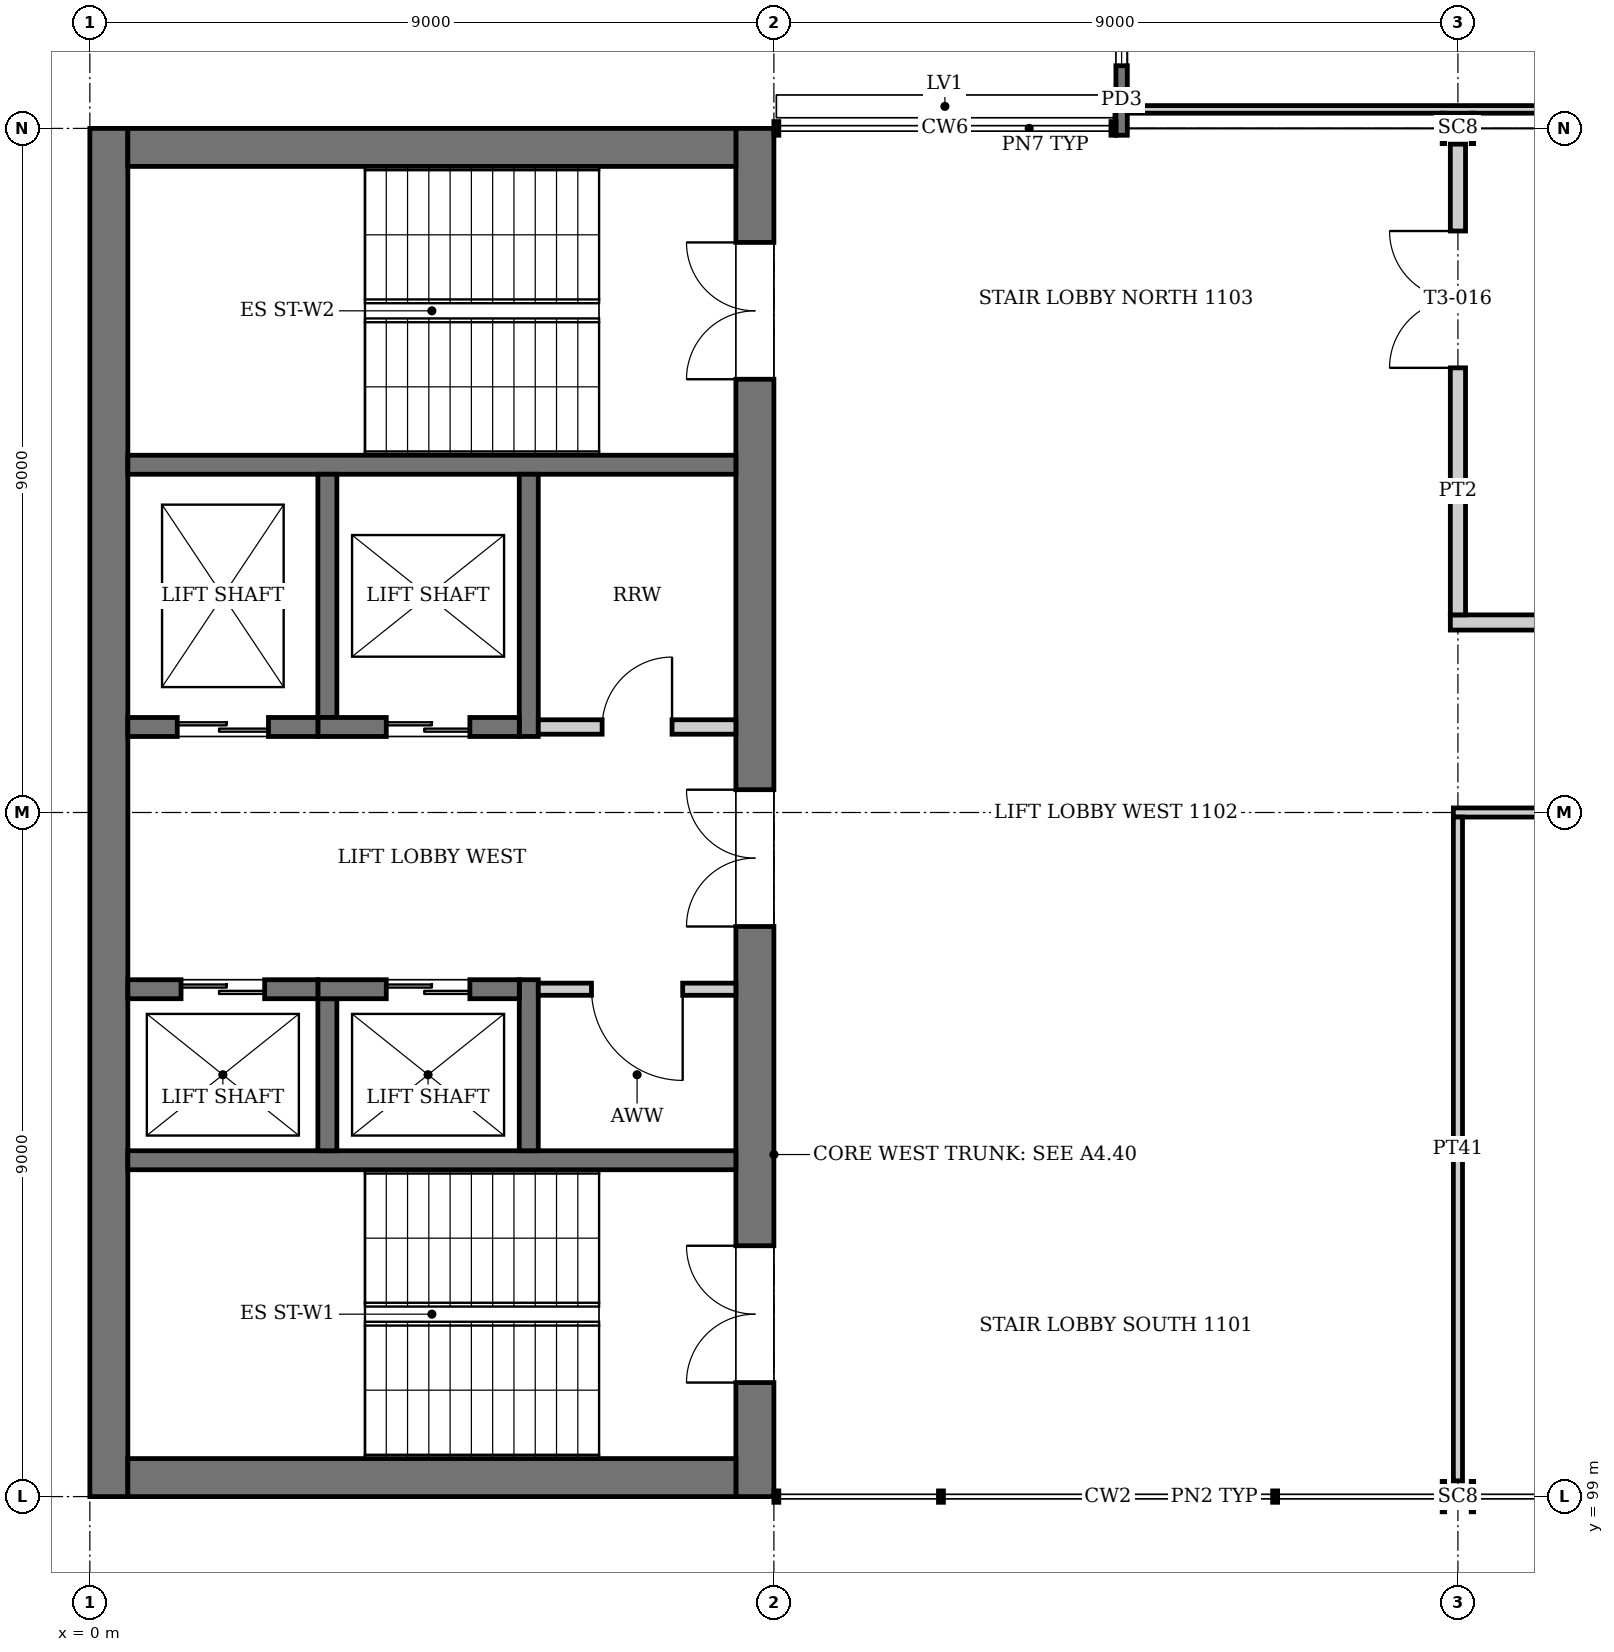
"""IFC4 building model, lengths in metres.
Left out: names, types, materials, properties, quantities, classifications, styles, units other than length and angle.
Written with IfcOpenShell. Run it as: python <this file> out.ifc"""

import sys

from ifc_helpers import new_model, si_unit, direction, frame, frame_2d, origin, origin_2d, place, context, subcontext, project, spatial, rectangle, i_section, extrude, element, fill, save


model = new_model("IFC4")
c1 = context("Model", 3, precision=1e-05, world=origin(), true_north=direction((0.0, 1.0)))
c2 = subcontext(c1, "Body", "Model", "MODEL_VIEW")
j1 = project(units=[si_unit("LENGTHUNIT", "METRE"), si_unit("PLANEANGLEUNIT", "RADIAN")], contexts=[c1])
p1 = place(None, origin())
s1 = spatial("IfcSite", under=j1, at=p1, CompositionType="ELEMENT")
p2 = place(p1, origin())
s2 = spatial("IfcBuilding", under=s1, at=p2, CompositionType="ELEMENT")
p3 = place(p2, frame((0.0, 0.0, 47.2)))
s3 = spatial("IfcBuildingStorey", under=s2, at=p3, CompositionType="ELEMENT", Elevation=47.2)
for number, where, z_axis, x_axis in (
    (1, (18.0, 99.0, 0.0), (0.0, 0.0, 1.0), (0.0, 1.0, 0.0)),
    (2, (18.0, 117.0, 0.0), (0.0, 0.0, 1.0), (0.0, 1.0, 0.0)),
):
    element("IfcColumn", number, at=place(p3, frame(where, z_axis=z_axis, x_axis=x_axis)), inside=s3, PredefinedType="COLUMN", context=c2, shape_type="SweptSolid", body=[
        extrude(i_section(OverallWidth=0.4, OverallDepth=0.414, WebThickness=0.025, FlangeThickness=0.032, at=origin_2d()), origin(), (0.0, 0.0, 1.0), 4.0),
    ])
p4 = place(p3, frame((0.25, 99.0, 0.0), z_axis=(0.0, 0.0, 1.0), x_axis=(0.0, 1.0, 0.0)))
e3 = element("IfcWall", 3, at=p4, inside=s3, PredefinedType="SHEAR", context=c2, shape_type="SweptSolid", body=[
    extrude(rectangle(XDim=18.0, YDim=0.5, at=frame_2d((9.0, 0.0))), origin(), (0.0, 0.0, 1.0), 4.0),
])
p5 = place(p3, frame((8.75, 99.0, 0.0), z_axis=(0.0, 0.0, 1.0), x_axis=(0.0, 1.0, 0.0)))
e4 = element("IfcWall", 4, at=p5, inside=s3, PredefinedType="SHEAR", context=c2, shape_type="SweptSolid", body=[
    extrude(rectangle(XDim=18.0, YDim=0.5, at=frame_2d((9.0, 0.0))), origin(), (0.0, 0.0, 1.0), 4.0),
])
p6 = place(p5, frame((1.5, 0.0, 0.0)))
e5 = element("IfcOpeningElement", 5, at=p6, cuts=e4, PredefinedType="OPENING", context=c2, shape_type="SweptSolid", body=[
    extrude(rectangle(XDim=1.8, YDim=2.1, at=frame_2d((0.9, 1.05))), frame((0.0, 0.26, 0.0), z_axis=(0.0, -1.0, 0.0), x_axis=(1.0, 0.0, 0.0)), (0.0, 0.0, 1.0), 0.52),
])
p7 = place(p5, frame((14.7, 0.0, 0.0)))
e6 = element("IfcOpeningElement", 6, at=p7, cuts=e4, PredefinedType="OPENING", context=c2, shape_type="SweptSolid", body=[
    extrude(rectangle(XDim=1.8, YDim=2.1, at=frame_2d((0.9, 1.05))), frame((0.0, 0.26, 0.0), z_axis=(0.0, -1.0, 0.0), x_axis=(1.0, 0.0, 0.0)), (0.0, 0.0, 1.0), 0.52),
])
p8 = place(p5, frame((7.5, 0.0, 0.0)))
e7 = element("IfcOpeningElement", 7, at=p8, cuts=e4, PredefinedType="OPENING", context=c2, shape_type="SweptSolid", body=[
    extrude(rectangle(XDim=1.8, YDim=2.1, at=frame_2d((0.9, 1.05))), frame((0.0, 0.26, 0.0), z_axis=(0.0, -1.0, 0.0), x_axis=(1.0, 0.0, 0.0)), (0.0, 0.0, 1.0), 0.52),
])
for number, where, z_axis, x_axis in (
    (8, (0.5, 99.25, 0.0), (0.0, 0.0, 1.0), (1.0, 0.0, 0.0)),
    (9, (0.5, 116.75, 0.0), (0.0, 0.0, 1.0), (1.0, 0.0, 0.0)),
):
    element("IfcWall", number, at=place(p3, frame(where, z_axis=z_axis, x_axis=x_axis)), inside=s3, PredefinedType="SHEAR", context=c2, shape_type="SweptSolid", body=[
        extrude(rectangle(XDim=8.0, YDim=0.5, at=frame_2d((4.0, 0.0))), origin(), (0.0, 0.0, 1.0), 4.0),
    ])
p9 = place(p3, frame((13.575, 120.45, -0.15), z_axis=(0.0, 0.0, 1.0), x_axis=(0.0, -1.0, 0.0)))
e10 = element("IfcWall", 10, at=p9, inside=s3, PredefinedType="SOLIDWALL", context=c2, shape_type="SweptSolid", body=[
    extrude(rectangle(XDim=3.54, YDim=0.15, at=frame_2d((1.77, 0.0))), origin(), (0.0, 0.0, 1.0), 2.75),
])
p10 = place(p9, frame((0.625, 0.0, 1.05)))
e11 = element("IfcOpeningElement", 11, at=p10, cuts=e10, PredefinedType="OPENING", context=c2, shape_type="SweptSolid", body=[
    extrude(rectangle(XDim=2.0, YDim=1.4, at=frame_2d((1.0, 0.7))), frame((0.0, 0.085, 0.0), z_axis=(0.0, -1.0, 0.0), x_axis=(1.0, 0.0, 0.0)), (0.0, 0.0, 1.0), 0.17),
])
p11 = place(p3, frame((13.65, 117.25, 0.0), z_axis=(0.0, 0.0, 1.0), x_axis=(1.0, 0.0, 0.0)))
e12 = element("IfcWall", 12, at=p11, inside=s3, PredefinedType="PARTITIONING", context=c2, shape_type="SweptSolid", body=[
    extrude(rectangle(XDim=13.2, YDim=0.1, at=frame_2d((6.6, 0.0))), origin(), (0.0, 0.0, 1.0), 2.6),
])
p12 = place(p11, frame((6.1, 0.0, 0.0)))
e13 = element("IfcOpeningElement", 13, at=p12, cuts=e12, PredefinedType="OPENING", context=c2, shape_type="SweptSolid", body=[
    extrude(rectangle(XDim=0.9, YDim=2.1, at=frame_2d((0.45, 1.05))), frame((0.0, 0.06, 0.0), z_axis=(0.0, -1.0, 0.0), x_axis=(1.0, 0.0, 0.0)), (0.0, 0.0, 1.0), 0.12),
])
for number, where, z_axis, x_axis in (
    (14, (8.5, 103.425, 0.0), (0.0, 0.0, 1.0), (-1.0, 0.0, 0.0)),
    (15, (8.5, 112.575, 0.0), (0.0, 0.0, 1.0), (-1.0, 0.0, 0.0)),
):
    element("IfcWall", number, at=place(p3, frame(where, z_axis=z_axis, x_axis=x_axis)), inside=s3, PredefinedType="SOLIDWALL", context=c2, shape_type="SweptSolid", body=[
        extrude(rectangle(XDim=8.0, YDim=0.25, at=frame_2d((4.0, 0.0))), origin(), (0.0, 0.0, 1.0), 3.75),
    ])
p13 = place(p3, frame((5.775, 103.55, 0.0), z_axis=(0.0, 0.0, 1.0), x_axis=(0.0, 1.0, 0.0)))
e16 = element("IfcWall", 16, at=p13, inside=s3, PredefinedType="SOLIDWALL", context=c2, shape_type="SweptSolid", body=[
    extrude(rectangle(XDim=2.25, YDim=0.25, at=frame_2d((1.125, 0.0))), origin(), (0.0, 0.0, 1.0), 4.0),
])
p14 = place(p3, frame((3.125, 103.55, 0.0), z_axis=(0.0, 0.0, 1.0), x_axis=(0.0, 1.0, 0.0)))
e17 = element("IfcWall", 17, at=p14, inside=s3, PredefinedType="SOLIDWALL", context=c2, shape_type="SweptSolid", body=[
    extrude(rectangle(XDim=2.0, YDim=0.25, at=frame_2d((1.0, 0.0))), origin(), (0.0, 0.0, 1.0), 4.0),
])
p15 = place(p3, frame((5.65, 105.675, 0.0), z_axis=(0.0, 0.0, 1.0), x_axis=(-1.0, 0.0, 0.0)))
e18 = element("IfcWall", 18, at=p15, inside=s3, PredefinedType="SOLIDWALL", context=c2, shape_type="SweptSolid", body=[
    extrude(rectangle(XDim=2.65, YDim=0.25, at=frame_2d((1.325, 0.0))), origin(), (0.0, 0.0, 1.0), 4.0),
])
p16 = place(p15, frame((0.65, 0.0, 0.0)))
e19 = element("IfcOpeningElement", 19, at=p16, cuts=e18, PredefinedType="OPENING", context=c2, shape_type="SweptSolid", body=[
    extrude(rectangle(XDim=1.1, YDim=2.1, at=frame_2d((0.55, 1.05))), frame((0.0, 0.135, 0.0), z_axis=(0.0, -1.0, 0.0), x_axis=(1.0, 0.0, 0.0)), (0.0, 0.0, 1.0), 0.27),
])
p17 = place(p3, frame((3.0, 105.675, 0.0), z_axis=(0.0, 0.0, 1.0), x_axis=(-1.0, 0.0, 0.0)))
e20 = element("IfcWall", 20, at=p17, inside=s3, PredefinedType="SOLIDWALL", context=c2, shape_type="SweptSolid", body=[
    extrude(rectangle(XDim=2.5, YDim=0.25, at=frame_2d((1.25, 0.0))), origin(), (0.0, 0.0, 1.0), 4.0),
])
p18 = place(p17, frame((0.7, 0.0, 0.0)))
e21 = element("IfcOpeningElement", 21, at=p18, cuts=e20, PredefinedType="OPENING", context=c2, shape_type="SweptSolid", body=[
    extrude(rectangle(XDim=1.1, YDim=2.1, at=frame_2d((0.55, 1.05))), frame((0.0, 0.135, 0.0), z_axis=(0.0, -1.0, 0.0), x_axis=(1.0, 0.0, 0.0)), (0.0, 0.0, 1.0), 0.27),
])
p19 = place(p3, frame((5.775, 109.0, 0.0), z_axis=(0.0, 0.0, 1.0), x_axis=(0.0, 1.0, 0.0)))
e22 = element("IfcWall", 22, at=p19, inside=s3, PredefinedType="SOLIDWALL", context=c2, shape_type="SweptSolid", body=[
    extrude(rectangle(XDim=3.45, YDim=0.25, at=frame_2d((1.725, 0.0))), origin(), (0.0, 0.0, 1.0), 4.0),
])
p20 = place(p3, frame((3.125, 109.25, 0.0), z_axis=(0.0, 0.0, 1.0), x_axis=(0.0, 1.0, 0.0)))
e23 = element("IfcWall", 23, at=p20, inside=s3, PredefinedType="SOLIDWALL", context=c2, shape_type="SweptSolid", body=[
    extrude(rectangle(XDim=3.2, YDim=0.25, at=frame_2d((1.6, 0.0))), origin(), (0.0, 0.0, 1.0), 4.0),
])
p21 = place(p3, frame((5.65, 109.125, 0.0), z_axis=(0.0, 0.0, 1.0), x_axis=(-1.0, 0.0, 0.0)))
e24 = element("IfcWall", 24, at=p21, inside=s3, PredefinedType="SOLIDWALL", context=c2, shape_type="SweptSolid", body=[
    extrude(rectangle(XDim=2.65, YDim=0.25, at=frame_2d((1.325, 0.0))), origin(), (0.0, 0.0, 1.0), 4.0),
])
p22 = place(p21, frame((0.65, 0.0, 0.0)))
e25 = element("IfcOpeningElement", 25, at=p22, cuts=e24, PredefinedType="OPENING", context=c2, shape_type="SweptSolid", body=[
    extrude(rectangle(XDim=1.1, YDim=2.1, at=frame_2d((0.55, 1.05))), frame((0.0, 0.135, 0.0), z_axis=(0.0, -1.0, 0.0), x_axis=(1.0, 0.0, 0.0)), (0.0, 0.0, 1.0), 0.27),
])
p23 = place(p3, frame((3.0, 109.125, 0.0), z_axis=(0.0, 0.0, 1.0), x_axis=(-1.0, 0.0, 0.0)))
e26 = element("IfcWall", 26, at=p23, inside=s3, PredefinedType="SOLIDWALL", context=c2, shape_type="SweptSolid", body=[
    extrude(rectangle(XDim=2.5, YDim=0.25, at=frame_2d((1.25, 0.0))), origin(), (0.0, 0.0, 1.0), 4.0),
])
p24 = place(p23, frame((0.65, 0.0, 0.0)))
e27 = element("IfcOpeningElement", 27, at=p24, cuts=e26, PredefinedType="OPENING", context=c2, shape_type="SweptSolid", body=[
    extrude(rectangle(XDim=1.2, YDim=2.1, at=frame_2d((0.6, 1.05))), frame((0.0, 0.135, 0.0), z_axis=(0.0, -1.0, 0.0), x_axis=(1.0, 0.0, 0.0)), (0.0, 0.0, 1.0), 0.27),
])
p25 = place(p3, frame((8.5, 105.675, 0.0), z_axis=(0.0, 0.0, 1.0), x_axis=(-1.0, 0.0, 0.0)))
e28 = element("IfcWall", 28, at=p25, inside=s3, PredefinedType="PARTITIONING", context=c2, shape_type="SweptSolid", body=[
    extrude(rectangle(XDim=2.6, YDim=0.16, at=frame_2d((1.3, 0.0))), origin(), (0.0, 0.0, 1.0), 3.75),
])
p26 = place(p25, frame((0.7, 0.0, 0.0)))
e29 = element("IfcOpeningElement", 29, at=p26, cuts=e28, PredefinedType="OPENING", context=c2, shape_type="SweptSolid", body=[
    extrude(rectangle(XDim=1.2, YDim=2.1, at=frame_2d((0.6, 1.05))), frame((0.0, 0.09, 0.0), z_axis=(0.0, -1.0, 0.0), x_axis=(1.0, 0.0, 0.0)), (0.0, 0.0, 1.0), 0.18),
])
p27 = place(p3, frame((8.5, 109.125, 0.0), z_axis=(0.0, 0.0, 1.0), x_axis=(-1.0, 0.0, 0.0)))
e30 = element("IfcWall", 30, at=p27, inside=s3, PredefinedType="PARTITIONING", context=c2, shape_type="SweptSolid", body=[
    extrude(rectangle(XDim=2.6, YDim=0.19, at=frame_2d((1.3, 0.0))), origin(), (0.0, 0.0, 1.0), 3.75),
])
p28 = place(p27, frame((0.84, 0.0, 0.0)))
e31 = element("IfcOpeningElement", 31, at=p28, cuts=e30, PredefinedType="OPENING", context=c2, shape_type="SweptSolid", body=[
    extrude(rectangle(XDim=0.92, YDim=2.1, at=frame_2d((0.46, 1.05))), frame((0.0, 0.105, 0.0), z_axis=(0.0, -1.0, 0.0), x_axis=(1.0, 0.0, 0.0)), (0.0, 0.0, 1.0), 0.21),
])
p29 = place(p3, frame((17.94, 108.0, 0.0), z_axis=(0.0, 0.0, 1.0), x_axis=(1.0, 0.0, 0.0)))
e32 = element("IfcWall", 32, at=p29, inside=s3, PredefinedType="PARTITIONING", context=c2, shape_type="SweptSolid", body=[
    extrude(rectangle(XDim=17.985, YDim=0.12, at=frame_2d((8.993, 0.0))), origin(), (0.0, 0.0, 1.0), 3.05),
])
p30 = place(p29, frame((3.66, 0.0, 0.0)))
e33 = element("IfcOpeningElement", 33, at=p30, cuts=e32, PredefinedType="OPENING", context=c2, shape_type="SweptSolid", body=[
    extrude(rectangle(XDim=1.8, YDim=2.1, at=frame_2d((0.9, 1.05))), frame((0.0, 0.07, 0.0), z_axis=(0.0, -1.0, 0.0), x_axis=(1.0, 0.0, 0.0)), (0.0, 0.0, 1.0), 0.14),
])
p31 = place(p29, frame((12.66, 0.0, 0.0)))
e34 = element("IfcOpeningElement", 34, at=p31, cuts=e32, PredefinedType="OPENING", context=c2, shape_type="SweptSolid", body=[
    extrude(rectangle(XDim=1.8, YDim=2.1, at=frame_2d((0.9, 1.05))), frame((0.0, 0.07, 0.0), z_axis=(0.0, -1.0, 0.0), x_axis=(1.0, 0.0, 0.0)), (0.0, 0.0, 1.0), 0.14),
])
p32 = place(p3, frame((17.9, 110.5, 0.0), z_axis=(0.0, 0.0, 1.0), x_axis=(1.0, 0.0, 0.0)))
e35 = element("IfcWall", 35, at=p32, inside=s3, PredefinedType="PARTITIONING", context=c2, shape_type="SweptSolid", body=[
    extrude(rectangle(XDim=22.7, YDim=0.2, at=frame_2d((11.35, 0.0))), origin(), (0.0, 0.0, 1.0), 3.05),
])
p33 = place(p32, frame((10.45, 0.0, 0.0)))
e36 = element("IfcOpeningElement", 36, at=p33, cuts=e35, PredefinedType="OPENING", context=c2, shape_type="SweptSolid", body=[
    extrude(rectangle(XDim=1.8, YDim=2.1, at=frame_2d((0.9, 1.05))), frame((0.0, 0.11, 0.0), z_axis=(0.0, -1.0, 0.0), x_axis=(1.0, 0.0, 0.0)), (0.0, 0.0, 1.0), 0.22),
])
p34 = place(p3, frame((18.0, 99.207, 0.0), z_axis=(0.0, 0.0, 1.0), x_axis=(0.0, 1.0, 0.0)))
e37 = element("IfcWall", 37, at=p34, inside=s3, PredefinedType="PARTITIONING", context=c2, shape_type="SweptSolid", body=[
    extrude(rectangle(XDim=8.733, YDim=0.12, at=frame_2d((4.366, 0.0))), origin(), (0.0, 0.0, 1.0), 3.05),
])
p35 = place(p3, frame((18.0, 110.6, 0.0), z_axis=(0.0, 0.0, 1.0), x_axis=(0.0, 1.0, 0.0)))
e38 = element("IfcWall", 38, at=p35, inside=s3, PredefinedType="PARTITIONING", context=c2, shape_type="SweptSolid", body=[
    extrude(rectangle(XDim=6.193, YDim=0.2, at=frame_2d((3.096, 0.0))), origin(), (0.0, 0.0, 1.0), 3.05),
])
p36 = place(p35, frame((3.25, 0.0, 0.0)))
e39 = element("IfcOpeningElement", 39, at=p36, cuts=e38, PredefinedType="OPENING", context=c2, shape_type="SweptSolid", body=[
    extrude(rectangle(XDim=1.8, YDim=2.1, at=frame_2d((0.9, 1.05))), frame((0.0, 0.11, 0.0), z_axis=(0.0, -1.0, 0.0), x_axis=(1.0, 0.0, 0.0)), (0.0, 0.0, 1.0), 0.22),
])
p37 = place(p10, origin())
e40 = element("IfcWindow", 40, at=p37, inside=s3, PartitioningType="SINGLE_PANEL", PredefinedType="WINDOW", context=c2, shape_type="SweptSolid", body=[
    extrude(rectangle(XDim=2.0, YDim=1.4, at=frame_2d((1.0, 0.7))), frame((0.0, 0.03, 0.0), z_axis=(0.0, -1.0, 0.0), x_axis=(1.0, 0.0, 0.0)), (0.0, 0.0, 1.0), 0.06),
])
fill(e11, e40)
p38 = place(p16, origin())
e41 = element("IfcDoor", 41, at=p38, inside=s3, OperationType="DOUBLE_DOOR_SLIDING", PredefinedType="DOOR", context=c2, shape_type="SweptSolid", body=[
    extrude(rectangle(XDim=1.1, YDim=2.1, at=frame_2d((0.55, 1.05))), frame((0.0, 0.025, 0.0), z_axis=(0.0, -1.0, 0.0), x_axis=(1.0, 0.0, 0.0)), (0.0, 0.0, 1.0), 0.05),
])
fill(e19, e41)
p39 = place(p18, origin())
e42 = element("IfcDoor", 42, at=p39, inside=s3, OperationType="DOUBLE_DOOR_SLIDING", PredefinedType="DOOR", context=c2, shape_type="SweptSolid", body=[
    extrude(rectangle(XDim=1.1, YDim=2.1, at=frame_2d((0.55, 1.05))), frame((0.0, 0.025, 0.0), z_axis=(0.0, -1.0, 0.0), x_axis=(1.0, 0.0, 0.0)), (0.0, 0.0, 1.0), 0.05),
])
fill(e21, e42)
p40 = place(p22, origin())
e43 = element("IfcDoor", 43, at=p40, inside=s3, OperationType="DOUBLE_DOOR_SLIDING", PredefinedType="DOOR", context=c2, shape_type="SweptSolid", body=[
    extrude(rectangle(XDim=1.1, YDim=2.1, at=frame_2d((0.55, 1.05))), frame((0.0, 0.025, 0.0), z_axis=(0.0, -1.0, 0.0), x_axis=(1.0, 0.0, 0.0)), (0.0, 0.0, 1.0), 0.05),
])
fill(e25, e43)
p41 = place(p24, origin())
e44 = element("IfcDoor", 44, at=p41, inside=s3, OperationType="DOUBLE_DOOR_SLIDING", PredefinedType="DOOR", context=c2, shape_type="SweptSolid", body=[
    extrude(rectangle(XDim=1.2, YDim=2.1, at=frame_2d((0.6, 1.05))), frame((0.0, 0.025, 0.0), z_axis=(0.0, -1.0, 0.0), x_axis=(1.0, 0.0, 0.0)), (0.0, 0.0, 1.0), 0.05),
])
fill(e27, e44)
p42 = place(p36, origin())
e45 = element("IfcDoor", 45, at=p42, inside=s3, OperationType="DOUBLE_DOOR_SINGLE_SWING", PredefinedType="DOOR", context=c2, shape_type="SweptSolid", body=[
    extrude(rectangle(XDim=1.8, YDim=2.1, at=frame_2d((0.9, 1.05))), frame((0.0, 0.025, 0.0), z_axis=(0.0, -1.0, 0.0), x_axis=(1.0, 0.0, 0.0)), (0.0, 0.0, 1.0), 0.05),
])
fill(e39, e45)
p43 = place(p6, origin())
e46 = element("IfcDoor", 46, at=p43, inside=s3, OperationType="DOUBLE_DOOR_SINGLE_SWING", PredefinedType="DOOR", context=c2, shape_type="SweptSolid", body=[
    extrude(rectangle(XDim=1.8, YDim=2.1, at=frame_2d((0.9, 1.05))), frame((0.0, 0.025, 0.0), z_axis=(0.0, -1.0, 0.0), x_axis=(1.0, 0.0, 0.0)), (0.0, 0.0, 1.0), 0.05),
])
fill(e5, e46)
p44 = place(p7, origin())
e47 = element("IfcDoor", 47, at=p44, inside=s3, OperationType="DOUBLE_DOOR_SINGLE_SWING", PredefinedType="DOOR", context=c2, shape_type="SweptSolid", body=[
    extrude(rectangle(XDim=1.8, YDim=2.1, at=frame_2d((0.9, 1.05))), frame((0.0, 0.025, 0.0), z_axis=(0.0, -1.0, 0.0), x_axis=(1.0, 0.0, 0.0)), (0.0, 0.0, 1.0), 0.05),
])
fill(e6, e47)
p45 = place(p8, origin())
e48 = element("IfcDoor", 48, at=p45, inside=s3, OperationType="DOUBLE_DOOR_SINGLE_SWING", PredefinedType="DOOR", context=c2, shape_type="SweptSolid", body=[
    extrude(rectangle(XDim=1.8, YDim=2.1, at=frame_2d((0.9, 1.05))), frame((0.0, 0.025, 0.0), z_axis=(0.0, -1.0, 0.0), x_axis=(1.0, 0.0, 0.0)), (0.0, 0.0, 1.0), 0.05),
])
fill(e7, e48)
p46 = place(p26, origin())
e49 = element("IfcDoor", 49, at=p46, inside=s3, OperationType="SINGLE_SWING_LEFT", PredefinedType="DOOR", context=c2, shape_type="SweptSolid", body=[
    extrude(rectangle(XDim=1.2, YDim=2.1, at=frame_2d((0.6, 1.05))), frame((0.0, 0.025, 0.0), z_axis=(0.0, -1.0, 0.0), x_axis=(1.0, 0.0, 0.0)), (0.0, 0.0, 1.0), 0.05),
])
fill(e29, e49)
p47 = place(p28, frame((0.92, 0.0, 0.0), z_axis=(0.0, 0.0, 1.0), x_axis=(-1.0, 0.0, 0.0)))
e50 = element("IfcDoor", 50, at=p47, inside=s3, OperationType="SINGLE_SWING_RIGHT", PredefinedType="DOOR", context=c2, shape_type="SweptSolid", body=[
    extrude(rectangle(XDim=0.92, YDim=2.1, at=frame_2d((0.46, 1.05))), frame((0.0, 0.025, 0.0), z_axis=(0.0, -1.0, 0.0), x_axis=(1.0, 0.0, 0.0)), (0.0, 0.0, 1.0), 0.05),
])
fill(e31, e50)
save(model, sys.argv[1])
